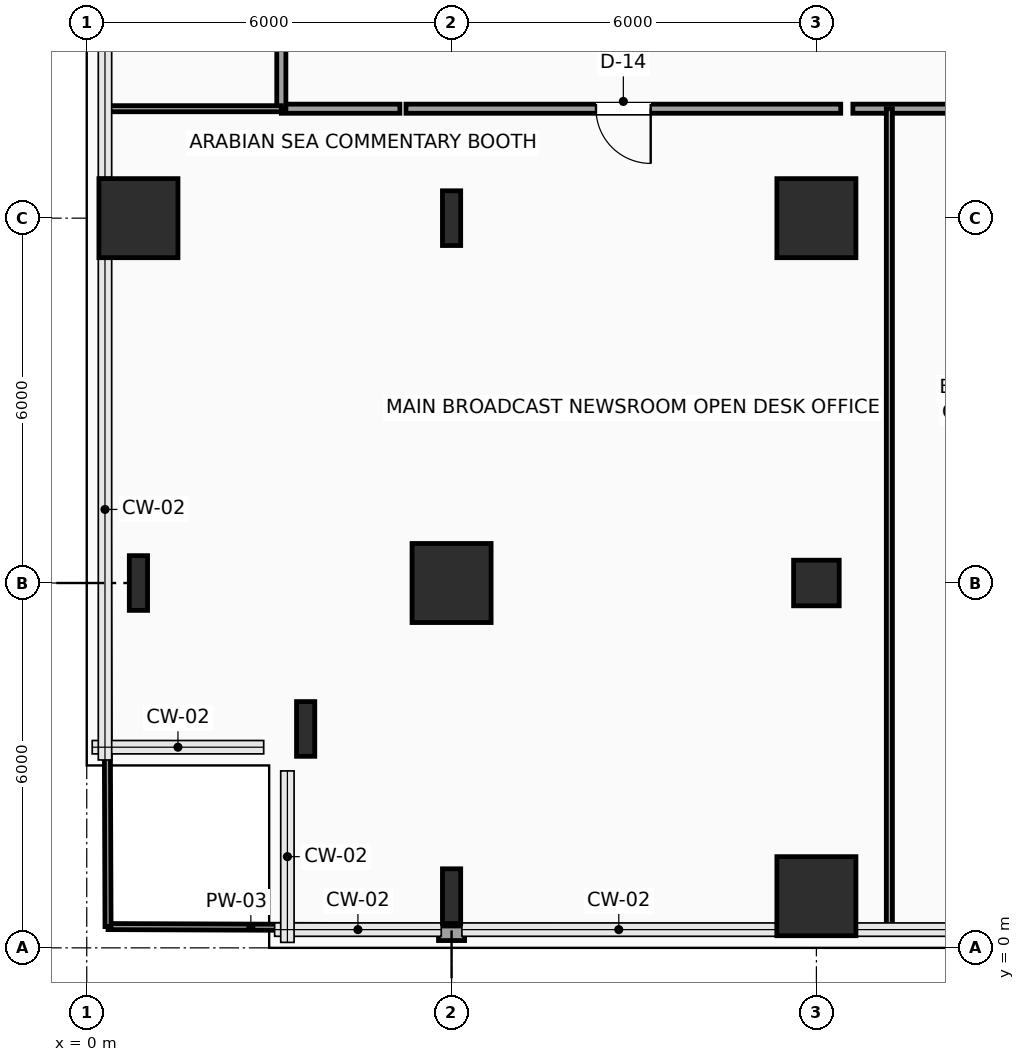
"""IFC4 building model, lengths in metres.
Left out: names, types, materials, properties, quantities, classifications, styles, units other than length and angle.
Written with IfcOpenShell. Run it as: python <this file> out.ifc"""

import sys

from ifc_helpers import new_model, si_unit, direction, frame, frame_2d, origin, origin_2d, place, context, subcontext, project, spatial, rectangle, hollow_rectangle, i_section, extrude, element, fill, save


model = new_model("IFC4")
c1 = context("Model", 3, precision=1e-05, world=origin(), true_north=direction((0.0, 1.0)))
c2 = subcontext(c1, "Body", "Model", "MODEL_VIEW")
j1 = project(units=[si_unit("LENGTHUNIT", "METRE"), si_unit("PLANEANGLEUNIT", "RADIAN")], contexts=[c1])
p1 = place(None, origin())
s1 = spatial("IfcSite", under=j1, at=p1, CompositionType="ELEMENT")
p2 = place(p1, origin())
s2 = spatial("IfcBuilding", under=s1, at=p2, CompositionType="ELEMENT")
p3 = place(p2, frame((0.0, 0.0, 40.2)))
s3 = spatial("IfcBuildingStorey", under=s2, at=p3, CompositionType="ELEMENT", Elevation=40.2)
for number, where, z_axis, x_axis in (
    (1, (3.6, 3.6, 0.0), (0.0, 0.0, 1.0), (1.0, 0.0, 0.0)),
    (2, (0.85, 6.0, 0.0), (0.0, 0.0, 1.0), (1.0, 0.0, 0.0)),
):
    element("IfcColumn", number, at=place(p3, frame(where, z_axis=z_axis, x_axis=x_axis)), inside=s3, PredefinedType="COLUMN", context=c2, shape_type="SweptSolid", body=[
        extrude(i_section(OverallWidth=0.3, OverallDepth=0.9, WebThickness=0.019, FlangeThickness=0.035, FilletRadius=0.03, at=origin_2d()), origin(), (0.0, 0.0, 1.0), 3.9),
    ])
p4 = place(p3, frame((0.85, 12.0, 0.0), z_axis=(0.0, 0.0, 1.0), x_axis=(1.0, 0.0, 0.0)))
e3 = element("IfcColumn", 3, at=p4, inside=s3, PredefinedType="COLUMN", context=c2, shape_type="SweptSolid", body=[
    extrude(rectangle(XDim=1.3, YDim=1.3, at=origin_2d()), origin(), (0.0, 0.0, 1.0), 3.9),
])
p5 = place(p3, frame((6.0, 0.85, 0.0), z_axis=(0.0, 0.0, 1.0), x_axis=(1.0, 0.0, 0.0)))
e4 = element("IfcColumn", 4, at=p5, inside=s3, PredefinedType="COLUMN", context=c2, shape_type="SweptSolid", body=[
    extrude(i_section(OverallWidth=0.3, OverallDepth=0.9, WebThickness=0.019, FlangeThickness=0.035, FilletRadius=0.03, at=origin_2d()), origin(), (0.0, 0.0, 1.0), 3.9),
])
p6 = place(p3, frame((6.0, 6.0, 0.0), z_axis=(0.0, 0.0, 1.0), x_axis=(1.0, 0.0, 0.0)))
e5 = element("IfcColumn", 5, at=p6, inside=s3, PredefinedType="COLUMN", context=c2, shape_type="SweptSolid", body=[
    extrude(rectangle(XDim=1.3, YDim=1.3, at=origin_2d()), origin(), (0.0, 0.0, 1.0), 3.9),
])
p7 = place(p3, frame((6.0, 12.0, 0.0), z_axis=(0.0, 0.0, 1.0), x_axis=(1.0, 0.0, 0.0)))
e6 = element("IfcColumn", 6, at=p7, inside=s3, PredefinedType="COLUMN", context=c2, shape_type="SweptSolid", body=[
    extrude(i_section(OverallWidth=0.3, OverallDepth=0.9, WebThickness=0.019, FlangeThickness=0.035, FilletRadius=0.03, at=origin_2d()), origin(), (0.0, 0.0, 1.0), 3.9),
])
p8 = place(p3, frame((12.0, 0.85, 0.0), z_axis=(0.0, 0.0, 1.0), x_axis=(1.0, 0.0, 0.0)))
e7 = element("IfcColumn", 7, at=p8, inside=s3, PredefinedType="COLUMN", context=c2, shape_type="SweptSolid", body=[
    extrude(rectangle(XDim=1.3, YDim=1.3, at=origin_2d()), origin(), (0.0, 0.0, 1.0), 3.9),
])
p9 = place(p3, frame((12.0, 6.0, 0.0), z_axis=(0.0, 0.0, 1.0), x_axis=(1.0, 0.0, 0.0)))
e8 = element("IfcColumn", 8, at=p9, inside=s3, PredefinedType="COLUMN", context=c2, shape_type="SweptSolid", body=[
    extrude(hollow_rectangle(XDim=0.75, YDim=0.75, WallThickness=0.035, InnerFilletRadius=0.035, OuterFilletRadius=0.05, at=origin_2d()), origin(), (0.0, 0.0, 1.0), 3.9),
])
p10 = place(p3, frame((12.0, 12.0, 0.0), z_axis=(0.0, 0.0, 1.0), x_axis=(1.0, 0.0, 0.0)))
e9 = element("IfcColumn", 9, at=p10, inside=s3, PredefinedType="COLUMN", context=c2, shape_type="SweptSolid", body=[
    extrude(rectangle(XDim=1.3, YDim=1.3, at=origin_2d()), origin(), (0.0, 0.0, 1.0), 3.9),
])
p11 = place(p3, frame((6.215, 0.24, 0.0), z_axis=(0.0, 0.0, 1.0), x_axis=(-1.0, 0.0, 0.0)))
e10 = element("IfcWall", 10, at=p11, inside=s3, PredefinedType="SOLIDWALL", context=c2, shape_type="SweptSolid", body=[
    extrude(rectangle(XDim=0.43, YDim=0.24, at=frame_2d((0.215, 0.0))), origin(), (0.0, 0.0, 1.0), 3.65),
])
p12 = place(p3, frame((21.55, 13.8, 0.0), z_axis=(0.0, 0.0, 1.0), x_axis=(-1.0, 0.0, 0.0)))
e11 = element("IfcWall", 11, at=p12, inside=s3, PredefinedType="PARTITIONING", context=c2, shape_type="SweptSolid", body=[
    extrude(rectangle(XDim=8.95, YDim=0.15, at=frame_2d((4.475, 0.0))), origin(), (0.0, 0.0, 1.0), 3.65),
])
p13 = place(p12, frame((5.4, 0.0, 0.0)))
e12 = element("IfcOpeningElement", 12, at=p13, cuts=e11, PredefinedType="OPENING", context=c2, shape_type="SweptSolid", body=[
    extrude(rectangle(XDim=0.9, YDim=2.1, at=frame_2d((0.45, 1.05))), frame((0.0, 0.085, 0.0), z_axis=(0.0, -1.0, 0.0), x_axis=(1.0, 0.0, 0.0)), (0.0, 0.0, 1.0), 0.17),
])
p14 = place(p12, frame((1.225, 0.0, 0.0)))
e13 = element("IfcOpeningElement", 13, at=p14, cuts=e11, PredefinedType="OPENING", context=c2, shape_type="SweptSolid", body=[
    extrude(rectangle(XDim=0.9, YDim=2.1, at=frame_2d((0.45, 1.05))), frame((0.0, 0.085, 0.0), z_axis=(0.0, -1.0, 0.0), x_axis=(1.0, 0.0, 0.0)), (0.0, 0.0, 1.0), 0.17),
])
p15 = place(p3, frame((12.4, 13.8, 0.0), z_axis=(0.0, 0.0, 1.0), x_axis=(-1.0, 0.0, 0.0)))
e14 = element("IfcWall", 14, at=p15, inside=s3, PredefinedType="PARTITIONING", context=c2, shape_type="SweptSolid", body=[
    extrude(rectangle(XDim=7.15, YDim=0.15, at=frame_2d((3.575, 0.0))), origin(), (0.0, 0.0, 1.0), 3.65),
])
p16 = place(p15, frame((3.125, 0.0, 0.0)))
e15 = element("IfcOpeningElement", 15, at=p16, cuts=e14, PredefinedType="OPENING", context=c2, shape_type="SweptSolid", body=[
    extrude(rectangle(XDim=0.9, YDim=2.1, at=frame_2d((0.45, 1.05))), frame((0.0, 0.085, 0.0), z_axis=(0.0, -1.0, 0.0), x_axis=(1.0, 0.0, 0.0)), (0.0, 0.0, 1.0), 0.17),
])
p17 = place(p3, frame((5.15, 13.8, 0.0), z_axis=(0.0, 0.0, 1.0), x_axis=(-1.0, 0.0, 0.0)))
e16 = element("IfcWall", 16, at=p17, inside=s3, PredefinedType="PARTITIONING", context=c2, shape_type="SweptSolid", body=[
    extrude(rectangle(XDim=1.95, YDim=0.15, at=frame_2d((0.975, 0.0))), origin(), (0.0, 0.0, 1.0), 3.65),
])
p18 = place(p3, frame((3.2, 13.8, 0.0), z_axis=(0.0, 0.0, 1.0), x_axis=(0.0, 1.0, 0.0)))
e17 = element("IfcWall", 17, at=p18, inside=s3, PredefinedType="PARTITIONING", context=c2, shape_type="SweptSolid", body=[
    extrude(rectangle(XDim=16.45, YDim=0.15, at=frame_2d((8.225, 0.0))), origin(), (0.0, 0.0, 1.0), 3.65),
])
p19 = place(p18, frame((2.65, 0.0, 0.0)))
e18 = element("IfcOpeningElement", 18, at=p19, cuts=e17, PredefinedType="OPENING", context=c2, shape_type="SweptSolid", body=[
    extrude(rectangle(XDim=0.9, YDim=2.1, at=frame_2d((0.45, 1.05))), frame((0.0, 0.085, 0.0), z_axis=(0.0, -1.0, 0.0), x_axis=(1.0, 0.0, 0.0)), (0.0, 0.0, 1.0), 0.17),
])
p20 = place(p18, frame((8.85, 0.0, 0.0)))
e19 = element("IfcOpeningElement", 19, at=p20, cuts=e17, PredefinedType="OPENING", context=c2, shape_type="SweptSolid", body=[
    extrude(rectangle(XDim=0.9, YDim=2.1, at=frame_2d((0.45, 1.05))), frame((0.0, 0.085, 0.0), z_axis=(0.0, -1.0, 0.0), x_axis=(1.0, 0.0, 0.0)), (0.0, 0.0, 1.0), 0.17),
])
p21 = place(p18, frame((13.975, 0.0, 0.0)))
e20 = element("IfcOpeningElement", 20, at=p21, cuts=e17, PredefinedType="OPENING", context=c2, shape_type="SweptSolid", body=[
    extrude(rectangle(XDim=0.9, YDim=2.1, at=frame_2d((0.45, 1.05))), frame((0.0, 0.085, 0.0), z_axis=(0.0, -1.0, 0.0), x_axis=(1.0, 0.0, 0.0)), (0.0, 0.0, 1.0), 0.17),
])
p22 = place(p3, frame((0.35, 0.35, 0.0), z_axis=(0.0, 0.0, 1.0), x_axis=(0.999992363151, -0.003908150379, 0.0)))
e21 = element("IfcWall", 21, at=p22, inside=s3, PredefinedType="PARTITIONING", context=c2, shape_type="SweptSolid", body=[
    extrude(rectangle(XDim=5.435, YDim=0.1, at=frame_2d((2.717, 0.0))), origin(), (0.0, 0.0, 1.0), 3.65),
])
p23 = place(p3, frame((6.215, 0.327, 0.0), z_axis=(0.0, 0.0, 1.0), x_axis=(0.999992473807, -0.003879733121, 0.0)))
e22 = element("IfcWall", 22, at=p23, inside=s3, PredefinedType="PARTITIONING", context=c2, shape_type="SweptSolid", body=[
    extrude(rectangle(XDim=6.985, YDim=0.1, at=frame_2d((3.492, 0.0))), origin(), (0.0, 0.0, 1.0), 3.65),
])
p24 = place(p3, frame((0.35, 0.35, 0.0), z_axis=(0.0, 0.0, 1.0), x_axis=(-0.003721090209, 0.99999307672, 0.0)))
e23 = element("IfcWall", 23, at=p24, inside=s3, PredefinedType="PARTITIONING", context=c2, shape_type="SweptSolid", body=[
    extrude(rectangle(XDim=13.45, YDim=0.1, at=frame_2d((6.725, 0.0))), origin(), (0.0, 0.0, 1.0), 3.65),
])
p25 = place(p3, frame((13.2, 0.3, 0.0), z_axis=(0.0, 0.0, 1.0), x_axis=(0.0, 1.0, 0.0)))
e24 = element("IfcWall", 24, at=p25, inside=s3, PredefinedType="PARTITIONING", context=c2, shape_type="SweptSolid", body=[
    extrude(rectangle(XDim=13.5, YDim=0.1, at=frame_2d((6.75, 0.0))), origin(), (0.0, 0.0, 1.0), 3.65),
])
p26 = place(p3, frame((0.3, 13.8, 0.0), z_axis=(0.0, 0.0, 1.0), x_axis=(1.0, 0.0, 0.0)))
e25 = element("IfcWall", 25, at=p26, inside=s3, PredefinedType="PARTITIONING", context=c2, shape_type="SweptSolid", body=[
    extrude(rectangle(XDim=2.9, YDim=0.1, at=frame_2d((1.45, 0.0))), origin(), (0.0, 0.0, 1.0), 3.65),
])
p27 = place(p16, origin())
e26 = element("IfcDoor", 26, at=p27, inside=s3, OperationType="SINGLE_SWING_LEFT", PredefinedType="DOOR", context=c2, shape_type="SweptSolid", body=[
    extrude(rectangle(XDim=0.9, YDim=2.1, at=frame_2d((0.45, 1.05))), frame((0.0, 0.025, 0.0), z_axis=(0.0, -1.0, 0.0), x_axis=(1.0, 0.0, 0.0)), (0.0, 0.0, 1.0), 0.05),
])
fill(e15, e26)
save(model, sys.argv[1])
